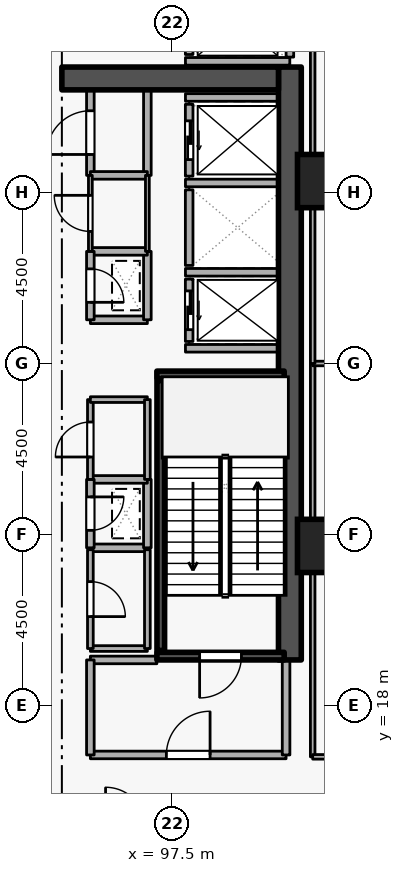
"""IFC4 building model, lengths in metres.
Left out: names, types, materials, properties, quantities, classifications, styles, units other than length and angle.
Written with IfcOpenShell. Run it as: python <this file> out.ifc"""

import sys

from ifc_helpers import new_model, si_unit, direction, frame, frame_2d, origin, origin_2d, place, context, subcontext, project, spatial, rectangle, extrude, element, fill, save


model = new_model("IFC4")
c1 = context("Model", 3, precision=1e-05, world=origin(), true_north=direction((0.0, 1.0)))
c2 = subcontext(c1, "Body", "Model", "MODEL_VIEW")
j1 = project(units=[si_unit("LENGTHUNIT", "METRE"), si_unit("PLANEANGLEUNIT", "RADIAN")], contexts=[c1])
p1 = place(None, origin())
s1 = spatial("IfcSite", under=j1, at=p1, CompositionType="ELEMENT")
p2 = place(p1, origin())
s2 = spatial("IfcBuilding", under=s1, at=p2, CompositionType="ELEMENT")
p3 = place(p2, frame((0.0, 0.0, 14.1)))
s3 = spatial("IfcBuildingStorey", under=s2, at=p3, CompositionType="ELEMENT", Elevation=14.1)
p4 = place(p3, frame((100.6, 19.2, 0.0), z_axis=(0.0, 0.0, 1.0), x_axis=(0.0, 1.0, 0.0)))
e1 = element("IfcWall", 1, at=p4, inside=s3, PredefinedType="SHEAR", context=c2, shape_type="SweptSolid", body=[
    extrude(rectangle(XDim=15.6, YDim=0.6, at=frame_2d((7.8, 0.0))), origin(), (0.0, 0.0, 1.0), 4.5),
])
p5 = place(p3, frame((94.6, 34.5, 0.0), z_axis=(0.0, 0.0, 1.0), x_axis=(1.0, 0.0, 0.0)))
e2 = element("IfcWall", 2, at=p5, inside=s3, PredefinedType="SHEAR", context=c2, shape_type="SweptSolid", body=[
    extrude(rectangle(XDim=5.7, YDim=0.6, at=frame_2d((2.85, 0.0))), origin(), (0.0, 0.0, 1.0), 4.5),
])
for number, where, z_axis, x_axis in (
    (3, (101.5, 22.2, 0.0), (0.0, 0.0, 1.0), (1.0, 0.0, 0.0)),
    (4, (101.5, 31.8, 0.0), (0.0, 0.0, 1.0), (1.0, 0.0, 0.0)),
):
    element("IfcColumn", number, at=place(p3, frame(where, z_axis=z_axis, x_axis=x_axis)), inside=s3, PredefinedType="COLUMN", context=c2, shape_type="SweptSolid", body=[
        extrude(rectangle(XDim=1.4, YDim=1.4, at=origin_2d()), origin(), (0.0, 0.0, 1.0), 4.5),
    ])
p6 = place(p3, frame((97.95, 29.22, 0.0), z_axis=(0.0, 0.0, 1.0), x_axis=(0.0, -1.0, 0.0)))
e5 = element("IfcWall", 5, at=p6, inside=s3, PredefinedType="STANDARD", context=c2, shape_type="SweptSolid", body=[
    extrude(rectangle(XDim=1.64, YDim=0.2, at=frame_2d((0.82, 0.0))), origin(), (0.0, 0.0, 1.0), 4.16),
])
p7 = place(p6, frame((0.31, 0.0, 0.0)))
e6 = element("IfcOpeningElement", 6, at=p7, cuts=e5, PredefinedType="OPENING", context=c2, shape_type="SweptSolid", body=[
    extrude(rectangle(XDim=1.02, YDim=2.06, at=frame_2d((0.51, 1.03))), frame((0.0, 0.11, 0.0), z_axis=(0.0, -1.0, 0.0), x_axis=(1.0, 0.0, 0.0)), (0.0, 0.0, 1.0), 0.22),
])
p8 = place(p3, frame((97.95, 31.57, 0.0), z_axis=(0.0, 0.0, 1.0), x_axis=(0.0, -1.0, 0.0)))
e7 = element("IfcWall", 7, at=p8, inside=s3, PredefinedType="STANDARD", context=c2, shape_type="SweptSolid", body=[
    extrude(rectangle(XDim=1.99, YDim=0.2, at=frame_2d((0.995, 0.0))), origin(), (0.0, 0.0, 1.0), 4.16),
])
p9 = place(p3, frame((97.95, 33.82, 0.0), z_axis=(0.0, 0.0, 1.0), x_axis=(0.0, -1.0, 0.0)))
e8 = element("IfcWall", 8, at=p9, inside=s3, PredefinedType="STANDARD", context=c2, shape_type="SweptSolid", body=[
    extrude(rectangle(XDim=1.89, YDim=0.2, at=frame_2d((0.945, 0.0))), origin(), (0.0, 0.0, 1.0), 4.16),
])
p10 = place(p9, frame((0.435, 0.0, 0.0)))
e9 = element("IfcOpeningElement", 9, at=p10, cuts=e8, PredefinedType="OPENING", context=c2, shape_type="SweptSolid", body=[
    extrude(rectangle(XDim=1.02, YDim=2.06, at=frame_2d((0.51, 1.03))), frame((0.0, 0.11, 0.0), z_axis=(0.0, -1.0, 0.0), x_axis=(1.0, 0.0, 0.0)), (0.0, 0.0, 1.0), 0.22),
])
p11 = place(p3, frame((97.95, 36.87, 0.0), z_axis=(0.0, 0.0, 1.0), x_axis=(0.0, -1.0, 0.0)))
e10 = element("IfcWall", 10, at=p11, inside=s3, PredefinedType="STANDARD", context=c2, shape_type="SweptSolid", body=[
    extrude(rectangle(XDim=1.74, YDim=0.2, at=frame_2d((0.87, 0.0))), origin(), (0.0, 0.0, 1.0), 4.16),
])
p12 = place(p11, frame((0.36, 0.0, 0.0)))
e11 = element("IfcOpeningElement", 11, at=p12, cuts=e10, PredefinedType="OPENING", context=c2, shape_type="SweptSolid", body=[
    extrude(rectangle(XDim=1.02, YDim=2.06, at=frame_2d((0.51, 1.03))), frame((0.0, 0.11, 0.0), z_axis=(0.0, -1.0, 0.0), x_axis=(1.0, 0.0, 0.0)), (0.0, 0.0, 1.0), 0.22),
])
for number, where, z_axis, x_axis in (
    (12, (97.852, 29.4, 0.0), (0.0, 0.0, 1.0), (1.0, 0.0, 0.0)),
    (13, (97.852, 27.4, 0.0), (0.0, 0.0, 1.0), (1.0, 0.0, 0.0)),
    (14, (97.852, 31.75, 0.0), (0.0, 0.0, 1.0), (1.0, 0.0, 0.0)),
    (15, (97.852, 34.0, 0.0), (0.0, 0.0, 1.0), (1.0, 0.0, 0.0)),
):
    element("IfcWall", number, at=place(p3, frame(where, z_axis=z_axis, x_axis=x_axis)), inside=s3, PredefinedType="STANDARD", context=c2, shape_type="SweptSolid", body=[
        extrude(rectangle(XDim=2.436, YDim=0.2, at=frame_2d((1.218, 0.0))), origin(), (0.0, 0.0, 1.0), 4.16),
    ])
p13 = place(p3, frame((97.852, 34.95, 0.0), z_axis=(0.0, 0.0, 1.0), x_axis=(1.0, 0.0, 0.0)))
e16 = element("IfcWall", 16, at=p13, inside=s3, PredefinedType="STANDARD", context=c2, shape_type="SweptSolid", body=[
    extrude(rectangle(XDim=2.746, YDim=0.2, at=frame_2d((1.373, 0.0))), origin(), (0.0, 0.0, 1.0), 4.16),
])
p14 = place(p3, frame((100.6, 35.062, 0.0), z_axis=(0.0, 0.0, 1.0), x_axis=(0.0, 1.0, 0.0)))
e17 = element("IfcWall", 17, at=p14, inside=s3, PredefinedType="STANDARD", context=c2, shape_type="SweptSolid", body=[
    extrude(rectangle(XDim=1.856, YDim=0.2, at=frame_2d((0.928, 0.0))), origin(), (0.0, 0.0, 1.0), 4.16),
])
p15 = place(p3, frame((100.45, 19.3, 0.0), z_axis=(0.0, 0.0, 1.0), x_axis=(-1.0, 0.0, 0.0)))
e18 = element("IfcWall", 18, at=p15, inside=s3, PredefinedType="SHEAR", context=c2, shape_type="SweptSolid", body=[
    extrude(rectangle(XDim=3.35, YDim=0.2, at=frame_2d((1.675, 0.0))), origin(), (0.0, 0.0, 1.0), 4.5),
])
p16 = place(p15, frame((1.125, 0.0, 0.0)))
e19 = element("IfcOpeningElement", 19, at=p16, cuts=e18, PredefinedType="OPENING", context=c2, shape_type="SweptSolid", body=[
    extrude(rectangle(XDim=1.1, YDim=2.1, at=frame_2d((0.55, 1.05))), frame((0.0, 0.11, 0.0), z_axis=(0.0, -1.0, 0.0), x_axis=(1.0, 0.0, 0.0)), (0.0, 0.0, 1.0), 0.22),
])
p17 = place(p3, frame((97.1, 26.7, 0.0), z_axis=(0.0, 0.0, 1.0), x_axis=(1.0, 0.0, 0.0)))
e20 = element("IfcWall", 20, at=p17, inside=s3, PredefinedType="SHEAR", context=c2, shape_type="SweptSolid", body=[
    extrude(rectangle(XDim=3.35, YDim=0.2, at=frame_2d((1.675, 0.0))), origin(), (0.0, 0.0, 1.0), 4.5),
])
p18 = place(p3, frame((97.203, 26.55, 0.0), z_axis=(0.0, 0.0, 1.0), x_axis=(0.0, -1.0, 0.0)))
e21 = element("IfcWall", 21, at=p18, inside=s3, PredefinedType="SHEAR", context=c2, shape_type="SweptSolid", body=[
    extrude(rectangle(XDim=7.1, YDim=0.2, at=frame_2d((3.55, 0.0))), origin(), (0.0, 0.0, 1.0), 4.5),
])
p19 = place(p3, frame((95.35, 16.7, 0.0), z_axis=(0.0, 0.0, 1.0), x_axis=(1.0, 0.0, 0.0)))
e22 = element("IfcWall", 22, at=p19, inside=s3, PredefinedType="STANDARD", context=c2, shape_type="SweptSolid", body=[
    extrude(rectangle(XDim=5.15, YDim=0.2, at=frame_2d((2.575, 0.0))), origin(), (0.0, 0.0, 1.0), 4.16),
])
p20 = place(p19, frame((2.0, 0.0, 0.0)))
e23 = element("IfcOpeningElement", 23, at=p20, cuts=e22, PredefinedType="OPENING", context=c2, shape_type="SweptSolid", body=[
    extrude(rectangle(XDim=1.15, YDim=2.1, at=frame_2d((0.575, 1.05))), frame((0.0, 0.11, 0.0), z_axis=(0.0, -1.0, 0.0), x_axis=(1.0, 0.0, 0.0)), (0.0, 0.0, 1.0), 0.22),
])
p21 = place(p3, frame((100.5, 16.7, 0.0), z_axis=(0.0, 0.0, 1.0), x_axis=(0.0, 1.0, 0.0)))
e24 = element("IfcWall", 24, at=p21, inside=s3, PredefinedType="STANDARD", context=c2, shape_type="SweptSolid", body=[
    extrude(rectangle(XDim=2.5, YDim=0.2, at=frame_2d((1.25, 0.0))), origin(), (0.0, 0.0, 1.0), 4.16),
])
p22 = place(p3, frame((97.1, 19.2, 0.0), z_axis=(0.0, 0.0, 1.0), x_axis=(-1.0, 0.0, 0.0)))
e25 = element("IfcWall", 25, at=p22, inside=s3, PredefinedType="STANDARD", context=c2, shape_type="SweptSolid", body=[
    extrude(rectangle(XDim=1.75, YDim=0.2, at=frame_2d((0.875, 0.0))), origin(), (0.0, 0.0, 1.0), 3.365),
])
p23 = place(p3, frame((95.35, 19.2, 0.0), z_axis=(0.0, 0.0, 1.0), x_axis=(0.0, -1.0, 0.0)))
e26 = element("IfcWall", 26, at=p23, inside=s3, PredefinedType="STANDARD", context=c2, shape_type="SweptSolid", body=[
    extrude(rectangle(XDim=2.5, YDim=0.2, at=frame_2d((1.25, 0.0))), origin(), (0.0, 0.0, 1.0), 4.16),
])
p24 = place(p3, frame((95.35, 28.15, 0.0), z_axis=(0.0, 0.0, 1.0), x_axis=(1.0, 0.0, 0.0)))
e27 = element("IfcWall", 27, at=p24, inside=s3, PredefinedType="STANDARD", context=c2, shape_type="SweptSolid", body=[
    extrude(rectangle(XDim=1.5, YDim=0.2, at=frame_2d((0.75, 0.0))), origin(), (0.0, 0.0, 1.0), 4.16),
])
p25 = place(p3, frame((96.85, 28.15, 0.0), z_axis=(0.0, 0.0, 1.0), x_axis=(0.0, 1.0, 0.0)))
e28 = element("IfcWall", 28, at=p25, inside=s3, PredefinedType="STANDARD", context=c2, shape_type="SweptSolid", body=[
    extrude(rectangle(XDim=1.8, YDim=0.2, at=frame_2d((0.9, 0.0))), origin(), (0.0, 0.0, 1.0), 4.16),
])
p26 = place(p3, frame((96.85, 29.95, 0.0), z_axis=(0.0, 0.0, 1.0), x_axis=(-1.0, 0.0, 0.0)))
e29 = element("IfcWall", 29, at=p26, inside=s3, PredefinedType="STANDARD", context=c2, shape_type="SweptSolid", body=[
    extrude(rectangle(XDim=1.5, YDim=0.2, at=frame_2d((0.75, 0.0))), origin(), (0.0, 0.0, 1.0), 4.16),
])
p27 = place(p3, frame((95.35, 29.95, 0.0), z_axis=(0.0, 0.0, 1.0), x_axis=(0.0, -1.0, 0.0)))
e30 = element("IfcWall", 30, at=p27, inside=s3, PredefinedType="STANDARD", context=c2, shape_type="SweptSolid", body=[
    extrude(rectangle(XDim=1.8, YDim=0.2, at=frame_2d((0.9, 0.0))), origin(), (0.0, 0.0, 1.0), 4.16),
])
p28 = place(p27, frame((0.46, 0.0, 0.0)))
e31 = element("IfcOpeningElement", 31, at=p28, cuts=e30, PredefinedType="OPENING", context=c2, shape_type="SweptSolid", body=[
    extrude(rectangle(XDim=0.88, YDim=2.04, at=frame_2d((0.44, 1.02))), frame((0.0, 0.11, 0.0), z_axis=(0.0, -1.0, 0.0), x_axis=(1.0, 0.0, 0.0)), (0.0, 0.0, 1.0), 0.22),
])
p29 = place(p3, frame((95.35, 22.15, 0.0), z_axis=(0.0, 0.0, 1.0), x_axis=(1.0, 0.0, 0.0)))
e32 = element("IfcWall", 32, at=p29, inside=s3, PredefinedType="STANDARD", context=c2, shape_type="SweptSolid", body=[
    extrude(rectangle(XDim=1.5, YDim=0.2, at=frame_2d((0.75, 0.0))), origin(), (0.0, 0.0, 1.0), 4.16),
])
p30 = place(p3, frame((96.85, 22.15, 0.0), z_axis=(0.0, 0.0, 1.0), x_axis=(0.0, 1.0, 0.0)))
e33 = element("IfcWall", 33, at=p30, inside=s3, PredefinedType="STANDARD", context=c2, shape_type="SweptSolid", body=[
    extrude(rectangle(XDim=1.8, YDim=0.2, at=frame_2d((0.9, 0.0))), origin(), (0.0, 0.0, 1.0), 4.16),
])
p31 = place(p3, frame((96.85, 23.95, 0.0), z_axis=(0.0, 0.0, 1.0), x_axis=(-1.0, 0.0, 0.0)))
e34 = element("IfcWall", 34, at=p31, inside=s3, PredefinedType="STANDARD", context=c2, shape_type="SweptSolid", body=[
    extrude(rectangle(XDim=1.5, YDim=0.2, at=frame_2d((0.75, 0.0))), origin(), (0.0, 0.0, 1.0), 4.16),
])
p32 = place(p3, frame((95.35, 23.95, 0.0), z_axis=(0.0, 0.0, 1.0), x_axis=(0.0, -1.0, 0.0)))
e35 = element("IfcWall", 35, at=p32, inside=s3, PredefinedType="STANDARD", context=c2, shape_type="SweptSolid", body=[
    extrude(rectangle(XDim=1.8, YDim=0.2, at=frame_2d((0.9, 0.0))), origin(), (0.0, 0.0, 1.0), 4.16),
])
p33 = place(p32, frame((0.46, 0.0, 0.0)))
e36 = element("IfcOpeningElement", 36, at=p33, cuts=e35, PredefinedType="OPENING", context=c2, shape_type="SweptSolid", body=[
    extrude(rectangle(XDim=0.88, YDim=2.04, at=frame_2d((0.44, 1.02))), frame((0.0, 0.11, 0.0), z_axis=(0.0, -1.0, 0.0), x_axis=(1.0, 0.0, 0.0)), (0.0, 0.0, 1.0), 0.22),
])
p34 = place(p3, frame((95.35, 31.95, 0.0), z_axis=(0.0, 0.0, 1.0), x_axis=(0.0, 1.0, 0.0)))
e37 = element("IfcWall", 37, at=p34, inside=s3, PredefinedType="STANDARD", context=c2, shape_type="SweptSolid", body=[
    extrude(rectangle(XDim=2.25, YDim=0.2, at=frame_2d((1.125, 0.0))), origin(), (0.0, 0.0, 1.0), 4.16),
])
p35 = place(p34, frame((0.55, 0.0, 0.0)))
e38 = element("IfcOpeningElement", 38, at=p35, cuts=e37, PredefinedType="OPENING", context=c2, shape_type="SweptSolid", body=[
    extrude(rectangle(XDim=1.15, YDim=2.1, at=frame_2d((0.575, 1.05))), frame((0.0, 0.11, 0.0), z_axis=(0.0, -1.0, 0.0), x_axis=(1.0, 0.0, 0.0)), (0.0, 0.0, 1.0), 0.22),
])
p36 = place(p3, frame((96.85, 34.2, 0.0), z_axis=(0.0, 0.0, 1.0), x_axis=(0.0, -1.0, 0.0)))
e39 = element("IfcWall", 39, at=p36, inside=s3, PredefinedType="STANDARD", context=c2, shape_type="SweptSolid", body=[
    extrude(rectangle(XDim=2.25, YDim=0.2, at=frame_2d((1.125, 0.0))), origin(), (0.0, 0.0, 1.0), 4.16),
])
p37 = place(p3, frame((96.85, 31.95, 0.0), z_axis=(0.0, 0.0, 1.0), x_axis=(-1.0, 0.0, 0.0)))
e40 = element("IfcWall", 40, at=p37, inside=s3, PredefinedType="STANDARD", context=c2, shape_type="SweptSolid", body=[
    extrude(rectangle(XDim=1.5, YDim=0.2, at=frame_2d((0.75, 0.0))), origin(), (0.0, 0.0, 1.0), 4.16),
])
p38 = place(p3, frame((95.35, 19.5, 0.0), z_axis=(0.0, 0.0, 1.0), x_axis=(1.0, 0.0, 0.0)))
e41 = element("IfcWall", 41, at=p38, inside=s3, PredefinedType="PARTITIONING", context=c2, shape_type="SweptSolid", body=[
    extrude(rectangle(XDim=1.5, YDim=0.15, at=frame_2d((0.75, 0.0))), origin(), (0.0, 0.0, 1.0), 3.365),
])
p39 = place(p3, frame((96.85, 19.5, 0.0), z_axis=(0.0, 0.0, 1.0), x_axis=(0.0, 1.0, 0.0)))
e42 = element("IfcWall", 42, at=p39, inside=s3, PredefinedType="PARTITIONING", context=c2, shape_type="SweptSolid", body=[
    extrude(rectangle(XDim=2.6, YDim=0.15, at=frame_2d((1.3, 0.0))), origin(), (0.0, 0.0, 1.0), 4.16),
])
p40 = place(p3, frame((95.35, 22.1, 0.0), z_axis=(0.0, 0.0, 1.0), x_axis=(0.0, -1.0, 0.0)))
e43 = element("IfcWall", 43, at=p40, inside=s3, PredefinedType="PARTITIONING", context=c2, shape_type="SweptSolid", body=[
    extrude(rectangle(XDim=2.6, YDim=0.15, at=frame_2d((1.3, 0.0))), origin(), (0.0, 0.0, 1.0), 4.16),
])
p41 = place(p40, frame((0.84, 0.0, 0.0)))
e44 = element("IfcOpeningElement", 44, at=p41, cuts=e43, PredefinedType="OPENING", context=c2, shape_type="SweptSolid", body=[
    extrude(rectangle(XDim=0.92, YDim=2.08, at=frame_2d((0.46, 1.04))), frame((0.0, 0.085, 0.0), z_axis=(0.0, -1.0, 0.0), x_axis=(1.0, 0.0, 0.0)), (0.0, 0.0, 1.0), 0.17),
])
p42 = place(p3, frame((95.35, 23.95, 0.0), z_axis=(0.0, 0.0, 1.0), x_axis=(0.0, 1.0, 0.0)))
e45 = element("IfcWall", 45, at=p42, inside=s3, PredefinedType="PARTITIONING", context=c2, shape_type="SweptSolid", body=[
    extrude(rectangle(XDim=2.1, YDim=0.15, at=frame_2d((1.05, 0.0))), origin(), (0.0, 0.0, 1.0), 4.16),
])
p43 = place(p42, frame((0.59, 0.0, 0.0)))
e46 = element("IfcOpeningElement", 46, at=p43, cuts=e45, PredefinedType="OPENING", context=c2, shape_type="SweptSolid", body=[
    extrude(rectangle(XDim=0.92, YDim=2.08, at=frame_2d((0.46, 1.04))), frame((0.0, 0.085, 0.0), z_axis=(0.0, -1.0, 0.0), x_axis=(1.0, 0.0, 0.0)), (0.0, 0.0, 1.0), 0.17),
])
p44 = place(p3, frame((95.35, 26.05, 0.0), z_axis=(0.0, 0.0, 1.0), x_axis=(1.0, 0.0, 0.0)))
e47 = element("IfcWall", 47, at=p44, inside=s3, PredefinedType="PARTITIONING", context=c2, shape_type="SweptSolid", body=[
    extrude(rectangle(XDim=1.5, YDim=0.15, at=frame_2d((0.75, 0.0))), origin(), (0.0, 0.0, 1.0), 4.16),
])
p45 = place(p3, frame((96.85, 26.05, 0.0), z_axis=(0.0, 0.0, 1.0), x_axis=(0.0, -1.0, 0.0)))
e48 = element("IfcWall", 48, at=p45, inside=s3, PredefinedType="PARTITIONING", context=c2, shape_type="SweptSolid", body=[
    extrude(rectangle(XDim=2.1, YDim=0.15, at=frame_2d((1.05, 0.0))), origin(), (0.0, 0.0, 1.0), 4.16),
])
p46 = place(p3, frame((95.35, 29.95, 0.0), z_axis=(0.0, 0.0, 1.0), x_axis=(0.0, 1.0, 0.0)))
e49 = element("IfcWall", 49, at=p46, inside=s3, PredefinedType="PARTITIONING", context=c2, shape_type="SweptSolid", body=[
    extrude(rectangle(XDim=2.0, YDim=0.1, at=frame_2d((1.0, 0.0))), origin(), (0.0, 0.0, 1.0), 4.16),
])
p47 = place(p46, frame((0.525, 0.0, 0.0)))
e50 = element("IfcOpeningElement", 50, at=p47, cuts=e49, PredefinedType="OPENING", context=c2, shape_type="SweptSolid", body=[
    extrude(rectangle(XDim=0.95, YDim=2.1, at=frame_2d((0.475, 1.05))), frame((0.0, 0.06, 0.0), z_axis=(0.0, -1.0, 0.0), x_axis=(1.0, 0.0, 0.0)), (0.0, 0.0, 1.0), 0.12),
])
p48 = place(p3, frame((96.85, 31.95, 0.0), z_axis=(0.0, 0.0, 1.0), x_axis=(0.0, -1.0, 0.0)))
e51 = element("IfcWall", 51, at=p48, inside=s3, PredefinedType="PARTITIONING", context=c2, shape_type="SweptSolid", body=[
    extrude(rectangle(XDim=2.0, YDim=0.1, at=frame_2d((1.0, 0.0))), origin(), (0.0, 0.0, 1.0), 4.16),
])
p49 = place(p3, frame((101.2, 16.65, 0.0), z_axis=(0.0, 0.0, 1.0), x_axis=(0.0, 1.0, 0.0)))
e52 = element("IfcWall", 52, at=p49, inside=s3, PredefinedType="PARTITIONING", context=c2, shape_type="SweptSolid", body=[
    extrude(rectangle(XDim=10.35, YDim=0.12, at=frame_2d((5.175, 0.0))), origin(), (0.0, 0.0, 1.0), 4.16),
])
p50 = place(p3, frame((101.2, 27.0, 0.0), z_axis=(0.0, 0.0, 1.0), x_axis=(1.0, 0.0, 0.0)))
e53 = element("IfcWall", 53, at=p50, inside=s3, PredefinedType="PARTITIONING", context=c2, shape_type="SweptSolid", body=[
    extrude(rectangle(XDim=9.5, YDim=0.12, at=frame_2d((4.75, 0.0))), origin(), (0.0, 0.0, 1.0), 4.16),
])
p51 = place(p3, frame((110.7, 16.65, 0.0), z_axis=(0.0, 0.0, 1.0), x_axis=(-1.0, 0.0, 0.0)))
e54 = element("IfcWall", 54, at=p51, inside=s3, PredefinedType="PARTITIONING", context=c2, shape_type="SweptSolid", body=[
    extrude(rectangle(XDim=9.5, YDim=0.12, at=frame_2d((4.75, 0.0))), origin(), (0.0, 0.0, 1.0), 4.16),
])
p52 = place(p51, frame((4.225, 0.0, 0.0)))
e55 = element("IfcOpeningElement", 55, at=p52, cuts=e54, PredefinedType="OPENING", context=c2, shape_type="SweptSolid", body=[
    extrude(rectangle(XDim=1.05, YDim=2.1, at=frame_2d((0.525, 1.05))), frame((0.0, 0.07, 0.0), z_axis=(0.0, -1.0, 0.0), x_axis=(1.0, 0.0, 0.0)), (0.0, 0.0, 1.0), 0.14),
])
p53 = place(p3, frame((101.2, 27.0, 0.0), z_axis=(0.0, 0.0, 1.0), x_axis=(0.0, 1.0, 0.0)))
e56 = element("IfcWall", 56, at=p53, inside=s3, PredefinedType="PARTITIONING", context=c2, shape_type="SweptSolid", body=[
    extrude(rectangle(XDim=13.8, YDim=0.12, at=frame_2d((6.9, 0.0))), origin(), (0.0, 0.0, 1.0), 4.16),
])
p54 = place(p7, origin())
e57 = element("IfcDoor", 57, at=p54, inside=s3, OperationType="SLIDING_TO_LEFT", PredefinedType="DOOR", context=c2, shape_type="SweptSolid", body=[
    extrude(rectangle(XDim=1.02, YDim=2.06, at=frame_2d((0.51, 1.03))), frame((0.0, 0.025, 0.0), z_axis=(0.0, -1.0, 0.0), x_axis=(1.0, 0.0, 0.0)), (0.0, 0.0, 1.0), 0.05),
])
fill(e6, e57)
p55 = place(p10, origin())
e58 = element("IfcDoor", 58, at=p55, inside=s3, OperationType="SLIDING_TO_LEFT", PredefinedType="DOOR", context=c2, shape_type="SweptSolid", body=[
    extrude(rectangle(XDim=1.02, YDim=2.06, at=frame_2d((0.51, 1.03))), frame((0.0, 0.025, 0.0), z_axis=(0.0, -1.0, 0.0), x_axis=(1.0, 0.0, 0.0)), (0.0, 0.0, 1.0), 0.05),
])
fill(e9, e58)
p56 = place(p16, origin())
e59 = element("IfcDoor", 59, at=p56, inside=s3, OperationType="SINGLE_SWING_RIGHT", PredefinedType="DOOR", context=c2, shape_type="SweptSolid", body=[
    extrude(rectangle(XDim=1.1, YDim=2.1, at=frame_2d((0.55, 1.05))), frame((0.0, 0.025, 0.0), z_axis=(0.0, -1.0, 0.0), x_axis=(1.0, 0.0, 0.0)), (0.0, 0.0, 1.0), 0.05),
])
fill(e19, e59)
p57 = place(p20, origin())
e60 = element("IfcDoor", 60, at=p57, inside=s3, OperationType="SINGLE_SWING_RIGHT", PredefinedType="DOOR", context=c2, shape_type="SweptSolid", body=[
    extrude(rectangle(XDim=1.15, YDim=2.1, at=frame_2d((0.575, 1.05))), frame((0.0, 0.025, 0.0), z_axis=(0.0, -1.0, 0.0), x_axis=(1.0, 0.0, 0.0)), (0.0, 0.0, 1.0), 0.05),
])
fill(e23, e60)
p58 = place(p28, origin())
e61 = element("IfcDoor", 61, at=p58, inside=s3, OperationType="SINGLE_SWING_RIGHT", PredefinedType="DOOR", context=c2, shape_type="SweptSolid", body=[
    extrude(rectangle(XDim=0.88, YDim=2.04, at=frame_2d((0.44, 1.02))), frame((0.0, 0.025, 0.0), z_axis=(0.0, -1.0, 0.0), x_axis=(1.0, 0.0, 0.0)), (0.0, 0.0, 1.0), 0.05),
])
fill(e31, e61)
p59 = place(p33, origin())
e62 = element("IfcDoor", 62, at=p59, inside=s3, OperationType="SINGLE_SWING_LEFT", PredefinedType="DOOR", context=c2, shape_type="SweptSolid", body=[
    extrude(rectangle(XDim=0.88, YDim=2.04, at=frame_2d((0.44, 1.02))), frame((0.0, 0.025, 0.0), z_axis=(0.0, -1.0, 0.0), x_axis=(1.0, 0.0, 0.0)), (0.0, 0.0, 1.0), 0.05),
])
fill(e36, e62)
p60 = place(p41, origin())
e63 = element("IfcDoor", 63, at=p60, inside=s3, OperationType="SINGLE_SWING_RIGHT", PredefinedType="DOOR", context=c2, shape_type="SweptSolid", body=[
    extrude(rectangle(XDim=0.92, YDim=2.08, at=frame_2d((0.46, 1.04))), frame((0.0, 0.025, 0.0), z_axis=(0.0, -1.0, 0.0), x_axis=(1.0, 0.0, 0.0)), (0.0, 0.0, 1.0), 0.05),
])
fill(e44, e63)
p61 = place(p43, origin())
e64 = element("IfcDoor", 64, at=p61, inside=s3, OperationType="SINGLE_SWING_LEFT", PredefinedType="DOOR", context=c2, shape_type="SweptSolid", body=[
    extrude(rectangle(XDim=0.92, YDim=2.08, at=frame_2d((0.46, 1.04))), frame((0.0, 0.025, 0.0), z_axis=(0.0, -1.0, 0.0), x_axis=(1.0, 0.0, 0.0)), (0.0, 0.0, 1.0), 0.05),
])
fill(e46, e64)
p62 = place(p47, origin())
e65 = element("IfcDoor", 65, at=p62, inside=s3, OperationType="SINGLE_SWING_RIGHT", PredefinedType="DOOR", context=c2, shape_type="SweptSolid", body=[
    extrude(rectangle(XDim=0.95, YDim=2.1, at=frame_2d((0.475, 1.05))), frame((0.0, 0.025, 0.0), z_axis=(0.0, -1.0, 0.0), x_axis=(1.0, 0.0, 0.0)), (0.0, 0.0, 1.0), 0.05),
])
fill(e50, e65)
p63 = place(p35, origin())
e66 = element("IfcDoor", 66, at=p63, inside=s3, OperationType="SINGLE_SWING_LEFT", PredefinedType="DOOR", context=c2, shape_type="SweptSolid", body=[
    extrude(rectangle(XDim=1.15, YDim=2.1, at=frame_2d((0.575, 1.05))), frame((0.0, 0.025, 0.0), z_axis=(0.0, -1.0, 0.0), x_axis=(1.0, 0.0, 0.0)), (0.0, 0.0, 1.0), 0.05),
])
fill(e38, e66)
save(model, sys.argv[1])
